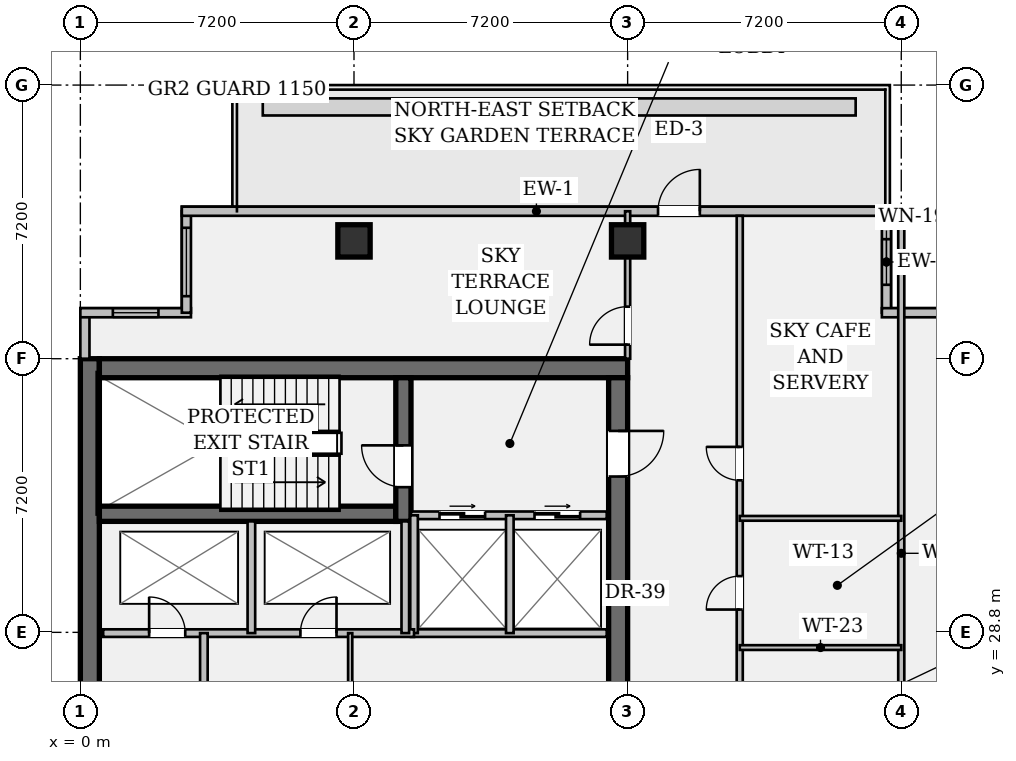
"""IFC4 building model, lengths in metres.
Left out: names, types, materials, properties, quantities, classifications, styles, units other than length and angle.
Written with IfcOpenShell. Run it as: python <this file> out.ifc"""

import sys

from ifc_helpers import new_model, si_unit, direction, frame, frame_2d, origin, origin_2d, place, context, subcontext, project, spatial, rectangle, hollow_rectangle, extrude, element, fill, save


model = new_model("IFC4")
c1 = context("Model", 3, precision=1e-05, world=origin(), true_north=direction((0.0, 1.0)))
c2 = subcontext(c1, "Body", "Model", "MODEL_VIEW")
j1 = project(units=[si_unit("LENGTHUNIT", "METRE"), si_unit("PLANEANGLEUNIT", "RADIAN")], contexts=[c1])
p1 = place(None, origin())
s1 = spatial("IfcSite", under=j1, at=p1, CompositionType="ELEMENT")
p2 = place(p1, origin())
s2 = spatial("IfcBuilding", under=s1, at=p2, CompositionType="ELEMENT")
p3 = place(p2, frame((0.0, 0.0, 168.7)))
s3 = spatial("IfcBuildingStorey", under=s2, at=p3, CompositionType="ELEMENT", Elevation=168.7)
p4 = place(p3, frame((0.25, 7.2, 0.0), z_axis=(0.0, 0.0, 1.0), x_axis=(0.0, 1.0, 0.0)))
e1 = element("IfcWall", 1, at=p4, inside=s3, PredefinedType="SHEAR", context=c2, shape_type="SweptSolid", body=[
    extrude(rectangle(XDim=28.8, YDim=0.5, at=frame_2d((14.4, 0.0))), origin(), (0.0, 0.0, 1.0), 4.29),
])
p5 = place(p3, frame((0.5, 35.75, 0.0), z_axis=(0.0, 0.0, 1.0), x_axis=(1.0, 0.0, 0.0)))
e2 = element("IfcWall", 2, at=p5, inside=s3, PredefinedType="SHEAR", context=c2, shape_type="SweptSolid", body=[
    extrude(rectangle(XDim=13.9, YDim=0.5, at=frame_2d((6.95, 0.0))), origin(), (0.0, 0.0, 1.0), 4.29),
])
p6 = place(p3, frame((14.15, 35.5, 0.0), z_axis=(0.0, 0.0, 1.0), x_axis=(0.0, -1.0, 0.0)))
e3 = element("IfcWall", 3, at=p6, inside=s3, PredefinedType="SHEAR", context=c2, shape_type="SweptSolid", body=[
    extrude(rectangle(XDim=27.8, YDim=0.5, at=frame_2d((13.9, 0.0))), origin(), (0.0, 0.0, 1.0), 4.29),
])
p7 = place(p6, frame((1.4, 0.0, 0.0)))
e4 = element("IfcOpeningElement", 4, at=p7, cuts=e3, PredefinedType="OPENING", context=c2, shape_type="SweptSolid", body=[
    extrude(rectangle(XDim=1.2, YDim=2.15, at=frame_2d((0.6, 1.075))), frame((0.0, 0.262, 0.0), z_axis=(0.0, -1.0, 0.0), x_axis=(1.0, 0.0, 0.0)), (0.0, 0.0, 1.0), 0.524),
])
p8 = place(p6, frame((25.35, 0.0, 0.0)))
e5 = element("IfcOpeningElement", 5, at=p8, cuts=e3, PredefinedType="OPENING", context=c2, shape_type="SweptSolid", body=[
    extrude(rectangle(XDim=1.2, YDim=2.15, at=frame_2d((0.6, 1.075))), frame((0.0, 0.262, 0.0), z_axis=(0.0, -1.0, 0.0), x_axis=(1.0, 0.0, 0.0)), (0.0, 0.0, 1.0), 0.524),
])
p9 = place(p6, frame((14.7, 0.0, 0.0)))
e6 = element("IfcOpeningElement", 6, at=p9, cuts=e3, PredefinedType="OPENING", context=c2, shape_type="SweptSolid", body=[
    extrude(rectangle(XDim=1.6, YDim=2.2, at=frame_2d((0.8, 1.1))), frame((0.0, 0.262, 0.0), z_axis=(0.0, -1.0, 0.0), x_axis=(1.0, 0.0, 0.0)), (0.0, 0.0, 1.0), 0.524),
])
p10 = place(p3, frame((0.5, 31.92, 0.0), z_axis=(0.0, 0.0, 1.0), x_axis=(1.0, 0.0, 0.0)))
e7 = element("IfcWall", 7, at=p10, inside=s3, PredefinedType="SHEAR", context=c2, shape_type="SweptSolid", body=[
    extrude(rectangle(XDim=7.8, YDim=0.4, at=frame_2d((3.9, 0.0))), origin(), (0.0, 0.0, 1.0), 4.29),
])
p11 = place(p3, frame((8.5, 31.72, 0.0), z_axis=(0.0, 0.0, 1.0), x_axis=(0.0, 1.0, 0.0)))
e8 = element("IfcWall", 8, at=p11, inside=s3, PredefinedType="SHEAR", context=c2, shape_type="SweptSolid", body=[
    extrude(rectangle(XDim=3.78, YDim=0.4, at=frame_2d((1.89, 0.0))), origin(), (0.0, 0.0, 1.0), 4.29),
])
p12 = place(p11, frame((0.9, 0.0, 0.0)))
e9 = element("IfcOpeningElement", 9, at=p12, cuts=e8, PredefinedType="OPENING", context=c2, shape_type="SweptSolid", body=[
    extrude(rectangle(XDim=1.1, YDim=2.15, at=frame_2d((0.55, 1.075))), frame((0.0, 0.212, 0.0), z_axis=(0.0, -1.0, 0.0), x_axis=(1.0, 0.0, 0.0)), (0.0, 0.0, 1.0), 0.424),
])
for number, where, z_axis, x_axis in (
    (10, (7.2, 39.1, 0.0), (0.0, 0.0, 1.0), (1.0, 0.0, 0.0)),
    (11, (14.4, 39.1, 0.0), (0.0, 0.0, 1.0), (1.0, 0.0, 0.0)),
):
    element("IfcColumn", number, at=place(p3, frame(where, z_axis=z_axis, x_axis=x_axis)), inside=s3, PredefinedType="COLUMN", context=c2, shape_type="SweptSolid", body=[
        extrude(hollow_rectangle(XDim=0.85, YDim=0.85, WallThickness=0.05, at=origin_2d()), origin(), (0.0, 0.0, 1.0), 4.29),
    ])
p13 = place(p3, frame((0.12, 36.0, 0.0), z_axis=(0.0, 0.0, 1.0), x_axis=(0.0, 1.0, 0.0)))
e12 = element("IfcWall", 12, at=p13, inside=s3, PredefinedType="STANDARD", context=c2, shape_type="SweptSolid", body=[
    extrude(rectangle(XDim=1.21, YDim=0.24, at=frame_2d((0.605, 0.0))), origin(), (0.0, 0.0, 1.0), 4.29),
])
p14 = place(p3, frame((0.0, 37.21, 0.0), z_axis=(0.0, 0.0, 1.0), x_axis=(1.0, 0.0, 0.0)))
e13 = element("IfcWall", 13, at=p14, inside=s3, PredefinedType="STANDARD", context=c2, shape_type="SweptSolid", body=[
    extrude(rectangle(XDim=2.91, YDim=0.24, at=frame_2d((1.455, 0.0))), origin(), (0.0, 0.0, 1.0), 4.29),
])
p15 = place(p14, frame((0.855, 0.0, 0.95)))
e14 = element("IfcOpeningElement", 14, at=p15, cuts=e13, PredefinedType="OPENING", context=c2, shape_type="SweptSolid", body=[
    extrude(rectangle(XDim=1.2, YDim=1.8, at=frame_2d((0.6, 0.9))), frame((0.0, 0.132, 0.0), z_axis=(0.0, -1.0, 0.0), x_axis=(1.0, 0.0, 0.0)), (0.0, 0.0, 1.0), 0.264),
])
p16 = place(p3, frame((2.79, 37.21, 0.0), z_axis=(0.0, 0.0, 1.0), x_axis=(0.0, 1.0, 0.0)))
e15 = element("IfcWall", 15, at=p16, inside=s3, PredefinedType="STANDARD", context=c2, shape_type="SweptSolid", body=[
    extrude(rectangle(XDim=2.67, YDim=0.24, at=frame_2d((1.335, 0.0))), origin(), (0.0, 0.0, 1.0), 4.29),
])
p17 = place(p16, frame((0.435, 0.0, 0.95)))
e16 = element("IfcOpeningElement", 16, at=p17, cuts=e15, PredefinedType="OPENING", context=c2, shape_type="SweptSolid", body=[
    extrude(rectangle(XDim=1.8, YDim=1.35, at=frame_2d((0.9, 0.675))), frame((0.0, 0.132, 0.0), z_axis=(0.0, -1.0, 0.0), x_axis=(1.0, 0.0, 0.0)), (0.0, 0.0, 1.0), 0.264),
])
p18 = place(p3, frame((2.67, 39.88, 0.0), z_axis=(0.0, 0.0, 1.0), x_axis=(1.0, 0.0, 0.0)))
e17 = element("IfcWall", 17, at=p18, inside=s3, PredefinedType="STANDARD", context=c2, shape_type="SweptSolid", body=[
    extrude(rectangle(XDim=18.66, YDim=0.24, at=frame_2d((9.33, 0.0))), origin(), (0.0, 0.0, 1.0), 4.29),
])
p19 = place(p18, frame((12.53, 0.0, 0.0)))
e18 = element("IfcOpeningElement", 18, at=p19, cuts=e17, PredefinedType="OPENING", context=c2, shape_type="SweptSolid", body=[
    extrude(rectangle(XDim=1.1, YDim=2.15, at=frame_2d((0.55, 1.075))), frame((0.0, 0.132, 0.0), z_axis=(0.0, -1.0, 0.0), x_axis=(1.0, 0.0, 0.0)), (0.0, 0.0, 1.0), 0.264),
])
p20 = place(p3, frame((21.21, 39.88, 0.0), z_axis=(0.0, 0.0, 1.0), x_axis=(0.0, -1.0, 0.0)))
e19 = element("IfcWall", 19, at=p20, inside=s3, PredefinedType="STANDARD", context=c2, shape_type="SweptSolid", body=[
    extrude(rectangle(XDim=2.67, YDim=0.24, at=frame_2d((1.335, 0.0))), origin(), (0.0, 0.0, 1.0), 4.29),
])
p21 = place(p20, frame((0.735, 0.0, 0.95)))
e20 = element("IfcOpeningElement", 20, at=p21, cuts=e19, PredefinedType="OPENING", context=c2, shape_type="SweptSolid", body=[
    extrude(rectangle(XDim=1.2, YDim=1.8, at=frame_2d((0.6, 0.9))), frame((0.0, 0.132, 0.0), z_axis=(0.0, -1.0, 0.0), x_axis=(1.0, 0.0, 0.0)), (0.0, 0.0, 1.0), 0.264),
])
p22 = place(p3, frame((21.09, 37.21, 0.0), z_axis=(0.0, 0.0, 1.0), x_axis=(1.0, 0.0, 0.0)))
e21 = element("IfcWall", 21, at=p22, inside=s3, PredefinedType="STANDARD", context=c2, shape_type="SweptSolid", body=[
    extrude(rectangle(XDim=2.91, YDim=0.24, at=frame_2d((1.455, 0.0))), origin(), (0.0, 0.0, 1.0), 4.29),
])
p23 = place(p3, frame((8.7, 31.88, 0.0), z_axis=(0.0, 0.0, 1.0), x_axis=(1.0, 0.0, 0.0)))
e22 = element("IfcWall", 22, at=p23, inside=s3, PredefinedType="PARTITIONING", context=c2, shape_type="SweptSolid", body=[
    extrude(rectangle(XDim=5.15, YDim=0.2, at=frame_2d((2.575, 0.0))), origin(), (0.0, 0.0, 1.0), 4.29),
])
p24 = place(p23, frame((0.75, 0.0, 0.0)))
e23 = element("IfcOpeningElement", 23, at=p24, cuts=e22, PredefinedType="OPENING", context=c2, shape_type="SweptSolid", body=[
    extrude(rectangle(XDim=1.2, YDim=2.2, at=frame_2d((0.6, 1.1))), frame((0.0, 0.112, 0.0), z_axis=(0.0, -1.0, 0.0), x_axis=(1.0, 0.0, 0.0)), (0.0, 0.0, 1.0), 0.224),
])
p25 = place(p23, frame((3.25, 0.0, 0.0)))
e24 = element("IfcOpeningElement", 24, at=p25, cuts=e22, PredefinedType="OPENING", context=c2, shape_type="SweptSolid", body=[
    extrude(rectangle(XDim=1.2, YDim=2.2, at=frame_2d((0.6, 1.1))), frame((0.0, 0.112, 0.0), z_axis=(0.0, -1.0, 0.0), x_axis=(1.0, 0.0, 0.0)), (0.0, 0.0, 1.0), 0.224),
])
p26 = place(p3, frame((8.7, 28.78, 0.0), z_axis=(0.0, 0.0, 1.0), x_axis=(1.0, 0.0, 0.0)))
e25 = element("IfcWall", 25, at=p26, inside=s3, PredefinedType="PARTITIONING", context=c2, shape_type="SweptSolid", body=[
    extrude(rectangle(XDim=5.15, YDim=0.2, at=frame_2d((2.575, 0.0))), origin(), (0.0, 0.0, 1.0), 4.29),
])
for number, where, z_axis, x_axis in (
    (26, (8.78, 28.78, 0.0), (0.0, 0.0, 1.0), (0.0, 1.0, 0.0)),
    (27, (11.3, 28.78, 0.0), (0.0, 0.0, 1.0), (0.0, 1.0, 0.0)),
):
    element("IfcWall", number, at=place(p3, frame(where, z_axis=z_axis, x_axis=x_axis)), inside=s3, PredefinedType="PARTITIONING", context=c2, shape_type="SweptSolid", body=[
        extrude(rectangle(XDim=3.1, YDim=0.2, at=frame_2d((1.55, 0.0))), origin(), (0.0, 0.0, 1.0), 4.29),
    ])
p27 = place(p3, frame((0.6, 28.78, 0.0), z_axis=(0.0, 0.0, 1.0), x_axis=(1.0, 0.0, 0.0)))
e28 = element("IfcWall", 28, at=p27, inside=s3, PredefinedType="PARTITIONING", context=c2, shape_type="SweptSolid", body=[
    extrude(rectangle(XDim=8.18, YDim=0.2, at=frame_2d((4.09, 0.0))), origin(), (0.0, 0.0, 1.0), 4.29),
])
p28 = place(p27, frame((1.21, 0.0, 0.0)))
e29 = element("IfcOpeningElement", 29, at=p28, cuts=e28, PredefinedType="OPENING", context=c2, shape_type="SweptSolid", body=[
    extrude(rectangle(XDim=0.95, YDim=2.15, at=frame_2d((0.475, 1.075))), frame((0.0, 0.112, 0.0), z_axis=(0.0, -1.0, 0.0), x_axis=(1.0, 0.0, 0.0)), (0.0, 0.0, 1.0), 0.224),
])
p29 = place(p27, frame((5.19, 0.0, 0.0)))
e30 = element("IfcOpeningElement", 30, at=p29, cuts=e28, PredefinedType="OPENING", context=c2, shape_type="SweptSolid", body=[
    extrude(rectangle(XDim=0.95, YDim=2.15, at=frame_2d((0.475, 1.075))), frame((0.0, 0.112, 0.0), z_axis=(0.0, -1.0, 0.0), x_axis=(1.0, 0.0, 0.0)), (0.0, 0.0, 1.0), 0.224),
])
for number, where, z_axis, x_axis in (
    (31, (4.5, 28.78, 0.0), (0.0, 0.0, 1.0), (0.0, 1.0, 0.0)),
    (32, (8.55, 28.78, 0.0), (0.0, 0.0, 1.0), (0.0, 1.0, 0.0)),
):
    element("IfcWall", number, at=place(p3, frame(where, z_axis=z_axis, x_axis=x_axis)), inside=s3, PredefinedType="PARTITIONING", context=c2, shape_type="SweptSolid", body=[
        extrude(rectangle(XDim=2.94, YDim=0.2, at=frame_2d((1.47, 0.0))), origin(), (0.0, 0.0, 1.0), 4.29),
    ])
p30 = place(p3, frame((3.25, 15.7, 0.0), z_axis=(0.0, 0.0, 1.0), x_axis=(0.0, 1.0, 0.0)))
e33 = element("IfcWall", 33, at=p30, inside=s3, PredefinedType="PARTITIONING", context=c2, shape_type="SweptSolid", body=[
    extrude(rectangle(XDim=13.08, YDim=0.2, at=frame_2d((6.54, 0.0))), origin(), (0.0, 0.0, 1.0), 4.29),
])
p31 = place(p30, frame((0.9, 0.0, 0.0)))
e34 = element("IfcOpeningElement", 34, at=p31, cuts=e33, PredefinedType="OPENING", context=c2, shape_type="SweptSolid", body=[
    extrude(rectangle(XDim=1.1, YDim=2.2, at=frame_2d((0.55, 1.1))), frame((0.0, 0.112, 0.0), z_axis=(0.0, -1.0, 0.0), x_axis=(1.0, 0.0, 0.0)), (0.0, 0.0, 1.0), 0.224),
])
p32 = place(p30, frame((3.5, 0.0, 0.0)))
e35 = element("IfcOpeningElement", 35, at=p32, cuts=e33, PredefinedType="OPENING", context=c2, shape_type="SweptSolid", body=[
    extrude(rectangle(XDim=1.1, YDim=2.2, at=frame_2d((0.55, 1.1))), frame((0.0, 0.112, 0.0), z_axis=(0.0, -1.0, 0.0), x_axis=(1.0, 0.0, 0.0)), (0.0, 0.0, 1.0), 0.224),
])
p33 = place(p30, frame((7.2, 0.0, 0.0)))
e36 = element("IfcOpeningElement", 36, at=p33, cuts=e33, PredefinedType="OPENING", context=c2, shape_type="SweptSolid", body=[
    extrude(rectangle(XDim=1.1, YDim=2.2, at=frame_2d((0.55, 1.1))), frame((0.0, 0.112, 0.0), z_axis=(0.0, -1.0, 0.0), x_axis=(1.0, 0.0, 0.0)), (0.0, 0.0, 1.0), 0.224),
])
p34 = place(p30, frame((9.8, 0.0, 0.0)))
e37 = element("IfcOpeningElement", 37, at=p34, cuts=e33, PredefinedType="OPENING", context=c2, shape_type="SweptSolid", body=[
    extrude(rectangle(XDim=1.1, YDim=2.2, at=frame_2d((0.55, 1.1))), frame((0.0, 0.112, 0.0), z_axis=(0.0, -1.0, 0.0), x_axis=(1.0, 0.0, 0.0)), (0.0, 0.0, 1.0), 0.224),
])
p35 = place(p3, frame((7.1, 22.2, 0.0), z_axis=(0.0, 0.0, 1.0), x_axis=(0.0, 1.0, 0.0)))
e38 = element("IfcWall", 38, at=p35, inside=s3, PredefinedType="PARTITIONING", context=c2, shape_type="SweptSolid", body=[
    extrude(rectangle(XDim=6.58, YDim=0.11, at=frame_2d((3.29, 0.0))), origin(), (0.0, 0.0, 1.0), 4.29),
])
p36 = place(p35, frame((1.1, 0.0, 0.0)))
e39 = element("IfcOpeningElement", 39, at=p36, cuts=e38, PredefinedType="OPENING", context=c2, shape_type="SweptSolid", body=[
    extrude(rectangle(XDim=0.88, YDim=2.15, at=frame_2d((0.44, 1.075))), frame((0.0, 0.067, 0.0), z_axis=(0.0, -1.0, 0.0), x_axis=(1.0, 0.0, 0.0)), (0.0, 0.0, 1.0), 0.134),
])
p37 = place(p35, frame((4.4, 0.0, 0.0)))
e40 = element("IfcOpeningElement", 40, at=p37, cuts=e38, PredefinedType="OPENING", context=c2, shape_type="SweptSolid", body=[
    extrude(rectangle(XDim=0.88, YDim=2.15, at=frame_2d((0.44, 1.075))), frame((0.0, 0.067, 0.0), z_axis=(0.0, -1.0, 0.0), x_axis=(1.0, 0.0, 0.0)), (0.0, 0.0, 1.0), 0.134),
])
p38 = place(p3, frame((17.35, 22.0, 0.0), z_axis=(0.0, 0.0, 1.0), x_axis=(0.0, 1.0, 0.0)))
e41 = element("IfcWall", 41, at=p38, inside=s3, PredefinedType="PARTITIONING", context=c2, shape_type="SweptSolid", body=[
    extrude(rectangle(XDim=17.76, YDim=0.16, at=frame_2d((8.88, 0.0))), origin(), (0.0, 0.0, 1.0), 3.653),
])
p39 = place(p38, frame((0.9, 0.0, 0.0)))
e42 = element("IfcOpeningElement", 42, at=p39, cuts=e41, PredefinedType="OPENING", context=c2, shape_type="SweptSolid", body=[
    extrude(rectangle(XDim=0.9, YDim=2.15, at=frame_2d((0.45, 1.075))), frame((0.0, 0.092, 0.0), z_axis=(0.0, -1.0, 0.0), x_axis=(1.0, 0.0, 0.0)), (0.0, 0.0, 1.0), 0.184),
])
p40 = place(p38, frame((4.0, 0.0, 0.0)))
e43 = element("IfcOpeningElement", 43, at=p40, cuts=e41, PredefinedType="OPENING", context=c2, shape_type="SweptSolid", body=[
    extrude(rectangle(XDim=0.88, YDim=2.15, at=frame_2d((0.44, 1.075))), frame((0.0, 0.092, 0.0), z_axis=(0.0, -1.0, 0.0), x_axis=(1.0, 0.0, 0.0)), (0.0, 0.0, 1.0), 0.184),
])
p41 = place(p38, frame((7.4, 0.0, 0.0)))
e44 = element("IfcOpeningElement", 44, at=p41, cuts=e41, PredefinedType="OPENING", context=c2, shape_type="SweptSolid", body=[
    extrude(rectangle(XDim=0.88, YDim=2.15, at=frame_2d((0.44, 1.075))), frame((0.0, 0.092, 0.0), z_axis=(0.0, -1.0, 0.0), x_axis=(1.0, 0.0, 0.0)), (0.0, 0.0, 1.0), 0.184),
])
p42 = place(p38, frame((10.8, 0.0, 0.0)))
e45 = element("IfcOpeningElement", 45, at=p42, cuts=e41, PredefinedType="OPENING", context=c2, shape_type="SweptSolid", body=[
    extrude(rectangle(XDim=0.88, YDim=2.15, at=frame_2d((0.44, 1.075))), frame((0.0, 0.092, 0.0), z_axis=(0.0, -1.0, 0.0), x_axis=(1.0, 0.0, 0.0)), (0.0, 0.0, 1.0), 0.184),
])
p43 = place(p3, frame((21.6, 22.0, 0.0), z_axis=(0.0, 0.0, 1.0), x_axis=(0.0, 1.0, 0.0)))
e46 = element("IfcWall", 46, at=p43, inside=s3, PredefinedType="PARTITIONING", context=c2, shape_type="SweptSolid", body=[
    extrude(rectangle(XDim=17.76, YDim=0.16, at=frame_2d((8.88, 0.0))), origin(), (0.0, 0.0, 1.0), 3.653),
])
for number, where, z_axis, x_axis in (
    (47, (17.35, 28.4, 0.0), (0.0, 0.0, 1.0), (1.0, 0.0, 0.0)),
    (48, (17.35, 31.8, 0.0), (0.0, 0.0, 1.0), (1.0, 0.0, 0.0)),
):
    element("IfcWall", number, at=place(p3, frame(where, z_axis=z_axis, x_axis=x_axis)), inside=s3, PredefinedType="PARTITIONING", context=c2, shape_type="SweptSolid", body=[
        extrude(rectangle(XDim=4.25, YDim=0.125, at=frame_2d((2.125, 0.0))), origin(), (0.0, 0.0, 1.0), 3.858),
    ])
p44 = place(p3, frame((14.4, 36.0, 0.0), z_axis=(0.0, 0.0, 1.0), x_axis=(0.0, 1.0, 0.0)))
e49 = element("IfcWall", 49, at=p44, inside=s3, PredefinedType="PARTITIONING", context=c2, shape_type="SweptSolid", body=[
    extrude(rectangle(XDim=3.88, YDim=0.135, at=frame_2d((1.94, 0.0))), origin(), (0.0, 0.0, 1.0), 3.653),
])
p45 = place(p44, frame((0.37, 0.0, 0.0)))
e50 = element("IfcOpeningElement", 50, at=p45, cuts=e49, PredefinedType="OPENING", context=c2, shape_type="SweptSolid", body=[
    extrude(rectangle(XDim=1.0, YDim=2.15, at=frame_2d((0.5, 1.075))), frame((0.0, 0.08, 0.0), z_axis=(0.0, -1.0, 0.0), x_axis=(1.0, 0.0, 0.0)), (0.0, 0.0, 1.0), 0.159),
])
p46 = place(p15, origin())
e51 = element("IfcWindow", 51, at=p46, inside=s3, PartitioningType="SINGLE_PANEL", PredefinedType="WINDOW", context=c2, shape_type="SweptSolid", body=[
    extrude(rectangle(XDim=1.2, YDim=1.8, at=frame_2d((0.6, 0.9))), frame((0.0, 0.03, 0.0), z_axis=(0.0, -1.0, 0.0), x_axis=(1.0, 0.0, 0.0)), (0.0, 0.0, 1.0), 0.06),
])
fill(e14, e51)
p47 = place(p17, origin())
e52 = element("IfcWindow", 52, at=p47, inside=s3, PartitioningType="SINGLE_PANEL", PredefinedType="WINDOW", context=c2, shape_type="SweptSolid", body=[
    extrude(rectangle(XDim=1.8, YDim=1.35, at=frame_2d((0.9, 0.675))), frame((0.0, 0.03, 0.0), z_axis=(0.0, -1.0, 0.0), x_axis=(1.0, 0.0, 0.0)), (0.0, 0.0, 1.0), 0.06),
])
fill(e16, e52)
p48 = place(p19, origin())
e53 = element("IfcDoor", 53, at=p48, inside=s3, OperationType="SINGLE_SWING_RIGHT", PredefinedType="DOOR", context=c2, shape_type="SweptSolid", body=[
    extrude(rectangle(XDim=1.1, YDim=2.15, at=frame_2d((0.55, 1.075))), frame((0.0, 0.025, 0.0), z_axis=(0.0, -1.0, 0.0), x_axis=(1.0, 0.0, 0.0)), (0.0, 0.0, 1.0), 0.05),
])
fill(e18, e53)
p49 = place(p21, origin())
e54 = element("IfcWindow", 54, at=p49, inside=s3, PartitioningType="SINGLE_PANEL", PredefinedType="WINDOW", context=c2, shape_type="SweptSolid", body=[
    extrude(rectangle(XDim=1.2, YDim=1.8, at=frame_2d((0.6, 0.9))), frame((0.0, 0.03, 0.0), z_axis=(0.0, -1.0, 0.0), x_axis=(1.0, 0.0, 0.0)), (0.0, 0.0, 1.0), 0.06),
])
fill(e20, e54)
p50 = place(p12, origin())
e55 = element("IfcDoor", 55, at=p50, inside=s3, OperationType="SINGLE_SWING_RIGHT", PredefinedType="DOOR", context=c2, shape_type="SweptSolid", body=[
    extrude(rectangle(XDim=1.1, YDim=2.15, at=frame_2d((0.55, 1.075))), frame((0.0, 0.025, 0.0), z_axis=(0.0, -1.0, 0.0), x_axis=(1.0, 0.0, 0.0)), (0.0, 0.0, 1.0), 0.05),
])
fill(e9, e55)
p51 = place(p7, origin())
e56 = element("IfcDoor", 56, at=p51, inside=s3, OperationType="SINGLE_SWING_LEFT", PredefinedType="DOOR", context=c2, shape_type="SweptSolid", body=[
    extrude(rectangle(XDim=1.2, YDim=2.15, at=frame_2d((0.6, 1.075))), frame((0.0, 0.025, 0.0), z_axis=(0.0, -1.0, 0.0), x_axis=(1.0, 0.0, 0.0)), (0.0, 0.0, 1.0), 0.05),
])
fill(e4, e56)
p52 = place(p24, origin())
e57 = element("IfcDoor", 57, at=p52, inside=s3, OperationType="DOUBLE_DOOR_SLIDING", PredefinedType="DOOR", context=c2, shape_type="SweptSolid", body=[
    extrude(rectangle(XDim=1.2, YDim=2.2, at=frame_2d((0.6, 1.1))), frame((0.0, 0.025, 0.0), z_axis=(0.0, -1.0, 0.0), x_axis=(1.0, 0.0, 0.0)), (0.0, 0.0, 1.0), 0.05),
])
fill(e23, e57)
p53 = place(p25, origin())
e58 = element("IfcDoor", 58, at=p53, inside=s3, OperationType="DOUBLE_DOOR_SLIDING", PredefinedType="DOOR", context=c2, shape_type="SweptSolid", body=[
    extrude(rectangle(XDim=1.2, YDim=2.2, at=frame_2d((0.6, 1.1))), frame((0.0, 0.025, 0.0), z_axis=(0.0, -1.0, 0.0), x_axis=(1.0, 0.0, 0.0)), (0.0, 0.0, 1.0), 0.05),
])
fill(e24, e58)
p54 = place(p28, origin())
e59 = element("IfcDoor", 59, at=p54, inside=s3, OperationType="SINGLE_SWING_LEFT", PredefinedType="DOOR", context=c2, shape_type="SweptSolid", body=[
    extrude(rectangle(XDim=0.95, YDim=2.15, at=frame_2d((0.475, 1.075))), frame((0.0, 0.025, 0.0), z_axis=(0.0, -1.0, 0.0), x_axis=(1.0, 0.0, 0.0)), (0.0, 0.0, 1.0), 0.05),
])
fill(e29, e59)
p55 = place(p29, origin())
e60 = element("IfcDoor", 60, at=p55, inside=s3, OperationType="SINGLE_SWING_RIGHT", PredefinedType="DOOR", context=c2, shape_type="SweptSolid", body=[
    extrude(rectangle(XDim=0.95, YDim=2.15, at=frame_2d((0.475, 1.075))), frame((0.0, 0.025, 0.0), z_axis=(0.0, -1.0, 0.0), x_axis=(1.0, 0.0, 0.0)), (0.0, 0.0, 1.0), 0.05),
])
fill(e30, e60)
p56 = place(p45, origin())
e61 = element("IfcDoor", 61, at=p56, inside=s3, OperationType="SINGLE_SWING_LEFT", PredefinedType="DOOR", context=c2, shape_type="SweptSolid", body=[
    extrude(rectangle(XDim=1.0, YDim=2.15, at=frame_2d((0.5, 1.075))), frame((0.0, 0.025, 0.0), z_axis=(0.0, -1.0, 0.0), x_axis=(1.0, 0.0, 0.0)), (0.0, 0.0, 1.0), 0.05),
])
fill(e50, e61)
p57 = place(p41, origin())
e62 = element("IfcDoor", 62, at=p57, inside=s3, OperationType="SINGLE_SWING_LEFT", PredefinedType="DOOR", context=c2, shape_type="SweptSolid", body=[
    extrude(rectangle(XDim=0.88, YDim=2.15, at=frame_2d((0.44, 1.075))), frame((0.0, 0.025, 0.0), z_axis=(0.0, -1.0, 0.0), x_axis=(1.0, 0.0, 0.0)), (0.0, 0.0, 1.0), 0.05),
])
fill(e44, e62)
p58 = place(p42, origin())
e63 = element("IfcDoor", 63, at=p58, inside=s3, OperationType="SINGLE_SWING_RIGHT", PredefinedType="DOOR", context=c2, shape_type="SweptSolid", body=[
    extrude(rectangle(XDim=0.88, YDim=2.15, at=frame_2d((0.44, 1.075))), frame((0.0, 0.025, 0.0), z_axis=(0.0, -1.0, 0.0), x_axis=(1.0, 0.0, 0.0)), (0.0, 0.0, 1.0), 0.05),
])
fill(e45, e63)
save(model, sys.argv[1])
